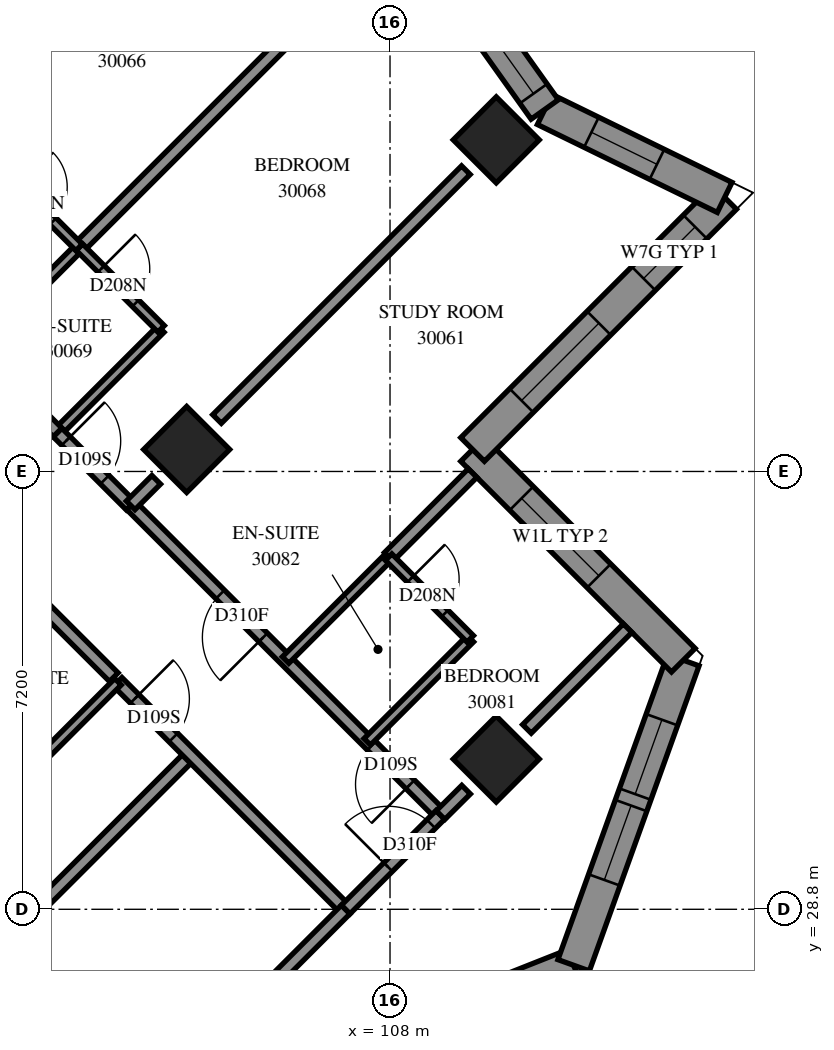
"""IFC4 building model, lengths in metres.
Left out: names, types, materials, properties, quantities, classifications, styles, units other than length and angle.
Written with IfcOpenShell. Run it as: python <this file> out.ifc"""

import sys

from ifc_helpers import new_model, si_unit, direction, frame, frame_2d, origin, origin_2d, place, context, subcontext, project, spatial, polyline, rectangle, outline, extrude, element, fill, save


model = new_model("IFC4")
c1 = context("Model", 3, precision=1e-05, world=origin(), true_north=direction((0.0, 1.0)))
c2 = subcontext(c1, "Body", "Model", "MODEL_VIEW")
j1 = project(units=[si_unit("LENGTHUNIT", "METRE"), si_unit("PLANEANGLEUNIT", "RADIAN")], contexts=[c1])
p1 = place(None, origin())
s1 = spatial("IfcSite", under=j1, at=p1, CompositionType="ELEMENT")
p2 = place(p1, origin())
s2 = spatial("IfcBuilding", under=s1, at=p2, CompositionType="ELEMENT")
p3 = place(p2, frame((0.0, 0.0, 111.8)))
s3 = spatial("IfcBuildingStorey", under=s2, at=p3, CompositionType="ELEMENT", Elevation=111.8)
for number, where, z_axis, x_axis in (
    (1, (109.747, 41.453, 0.0), (0.0, 0.0, 1.0), (0.707, -0.707, 0.0)),
    (2, (104.656, 36.362, 0.0), (0.0, 0.0, 1.0), (0.707, -0.707, 0.0)),
    (3, (109.747, 31.271, 0.0), (0.0, 0.0, 1.0), (0.707, -0.707, 0.0)),
):
    element("IfcColumn", number, at=place(p3, frame(where, z_axis=z_axis, x_axis=x_axis)), inside=s3, PredefinedType="COLUMN", context=c2, shape_type="SweptSolid", body=[
        extrude(rectangle(XDim=1.0, YDim=1.0, at=origin_2d()), origin(), (0.0, 0.0, 1.0), 3.1),
    ])
p4 = place(p3, frame((105.868, 25.835, 0.0), z_axis=(0.0, 0.0, 1.0), x_axis=(0.9295367521, 0.368729476, 0.0)))
e4 = element("IfcWall", 4, at=p4, inside=s3, PredefinedType="SOLIDWALL", context=c2, shape_type="SweptSolid", body=[
    extrude(outline(polyline([(0.119, -0.275), (5.667, -0.275), (5.418, 0.275), (-0.119, 0.275), (0.119, -0.275)])), origin(), (0.0, 0.0, 1.0), 3.1),
])
p5 = place(p4, frame((0.647, 0.0, 0.5)))
e5 = element("IfcOpeningElement", 5, at=p5, cuts=e4, PredefinedType="OPENING", context=c2, shape_type="SweptSolid", body=[
    extrude(rectangle(XDim=1.2, YDim=2.45, at=frame_2d((0.6, 1.225))), frame((0.0, 0.285, 0.0), z_axis=(0.0, -1.0, 0.0), x_axis=(1.0, 0.0, 0.0)), (0.0, 0.0, 1.0), 0.57),
])
p6 = place(p4, frame((3.156, 0.0, 0.5)))
e6 = element("IfcOpeningElement", 6, at=p6, cuts=e4, PredefinedType="OPENING", context=c2, shape_type="SweptSolid", body=[
    extrude(rectangle(XDim=1.2, YDim=2.45, at=frame_2d((0.6, 1.225))), frame((0.0, 0.285, 0.0), z_axis=(0.0, -1.0, 0.0), x_axis=(1.0, 0.0, 0.0)), (0.0, 0.0, 1.0), 0.57),
])
p7 = place(p3, frame((111.02, 27.879, 0.0), z_axis=(0.0, 0.0, 1.0), x_axis=(0.3382106652, 0.9410704256, 0.0)))
e7 = element("IfcWall", 7, at=p7, inside=s3, PredefinedType="SOLIDWALL", context=c2, shape_type="SweptSolid", body=[
    extrude(outline(polyline([(-0.124, -0.275), (5.506, -0.275), (5.157, 0.275), (0.124, 0.275), (-0.124, -0.275)])), origin(), (0.0, 0.0, 1.0), 3.1),
])
p8 = place(p7, frame((1.491, 0.0, 0.5)))
e8 = element("IfcOpeningElement", 8, at=p8, cuts=e7, PredefinedType="OPENING", context=c2, shape_type="SweptSolid", body=[
    extrude(rectangle(XDim=1.3, YDim=2.45, at=frame_2d((0.65, 1.225))), frame((0.0, 0.285, 0.0), z_axis=(0.0, -1.0, 0.0), x_axis=(1.0, 0.0, 0.0)), (0.0, 0.0, 1.0), 0.57),
])
p9 = place(p7, frame((2.991, 0.0, 0.5)))
e9 = element("IfcOpeningElement", 9, at=p9, cuts=e7, PredefinedType="OPENING", context=c2, shape_type="SweptSolid", body=[
    extrude(rectangle(XDim=1.3, YDim=2.45, at=frame_2d((0.65, 1.225))), frame((0.0, 0.285, 0.0), z_axis=(0.0, -1.0, 0.0), x_axis=(1.0, 0.0, 0.0)), (0.0, 0.0, 1.0), 0.57),
])
p10 = place(p3, frame((112.823, 32.897, 0.0), z_axis=(0.0, 0.0, 1.0), x_axis=(-0.7071067812, 0.7071067812, 0.0)))
e10 = element("IfcWall", 10, at=p10, inside=s3, PredefinedType="SOLIDWALL", context=c2, shape_type="SweptSolid", body=[
    extrude(outline(polyline([(-0.174, -0.275), (4.626, -0.275), (5.176, 0.275), (0.174, 0.275), (-0.174, -0.275)])), origin(), (0.0, 0.0, 1.0), 3.1),
])
p11 = place(p10, frame((1.963, 0.0, 0.6)))
e11 = element("IfcOpeningElement", 11, at=p11, cuts=e10, PredefinedType="OPENING", context=c2, shape_type="SweptSolid", body=[
    extrude(rectangle(XDim=1.8, YDim=1.9, at=frame_2d((0.9, 0.95))), frame((0.0, 0.285, 0.0), z_axis=(0.0, -1.0, 0.0), x_axis=(1.0, 0.0, 0.0)), (0.0, 0.0, 1.0), 0.57),
])
p12 = place(p3, frame((109.358, 36.362, 0.0), z_axis=(0.0, 0.0, 1.0), x_axis=(0.7071067812, 0.7071067812, 0.0)))
e12 = element("IfcWall", 12, at=p12, inside=s3, PredefinedType="SOLIDWALL", context=c2, shape_type="SweptSolid", body=[
    extrude(outline(polyline([(0.275, -0.275), (6.247, -0.275), (5.477, 0.275), (-0.275, 0.275), (0.275, -0.275)])), origin(), (0.0, 0.0, 1.0), 3.1),
])
p13 = place(p12, frame((1.137, 0.0, 0.6)))
e13 = element("IfcOpeningElement", 13, at=p13, cuts=e12, PredefinedType="OPENING", context=c2, shape_type="SweptSolid", body=[
    extrude(rectangle(XDim=1.8, YDim=1.9, at=frame_2d((0.9, 0.95))), frame((0.0, 0.285, 0.0), z_axis=(0.0, -1.0, 0.0), x_axis=(1.0, 0.0, 0.0)), (0.0, 0.0, 1.0), 0.57),
])
p14 = place(p12, frame((3.976, 0.0, 0.6)))
e14 = element("IfcOpeningElement", 14, at=p14, cuts=e12, PredefinedType="OPENING", context=c2, shape_type="SweptSolid", body=[
    extrude(rectangle(XDim=1.2, YDim=1.9, at=frame_2d((0.6, 0.95))), frame((0.0, 0.285, 0.0), z_axis=(0.0, -1.0, 0.0), x_axis=(1.0, 0.0, 0.0)), (0.0, 0.0, 1.0), 0.57),
])
p15 = place(p3, frame((113.503, 40.507, 0.0), z_axis=(0.0, 0.0, 1.0), x_axis=(-0.8984293541, 0.4391180887, 0.0)))
e15 = element("IfcWall", 15, at=p15, inside=s3, PredefinedType="SOLIDWALL", context=c2, shape_type="SweptSolid", body=[
    extrude(outline(polyline([(-0.385, -0.275), (3.224, -0.275), (3.363, 0.275), (0.385, 0.275), (-0.385, -0.275)])), origin(), (0.0, 0.0, 1.0), 3.1),
])
p16 = place(p15, frame((1.239, 0.0, 0.5)))
e16 = element("IfcOpeningElement", 16, at=p16, cuts=e15, PredefinedType="OPENING", context=c2, shape_type="SweptSolid", body=[
    extrude(rectangle(XDim=1.2, YDim=2.45, at=frame_2d((0.6, 1.225))), frame((0.0, 0.285, 0.0), z_axis=(0.0, -1.0, 0.0), x_axis=(1.0, 0.0, 0.0)), (0.0, 0.0, 1.0), 0.57),
])
p17 = place(p3, frame((110.544, 41.953, 0.0), z_axis=(0.0, 0.0, 1.0), x_axis=(-0.5805022438, 0.8142586474, 0.0)))
e17 = element("IfcWall", 17, at=p17, inside=s3, PredefinedType="SOLIDWALL", context=c2, shape_type="SweptSolid", body=[
    extrude(outline(polyline([(0.07, -0.275), (3.53, -0.275), (3.438, 0.275), (-0.07, 0.275), (0.07, -0.275)])), origin(), (0.0, 0.0, 1.0), 3.1),
])
p18 = place(p17, frame((0.319, 0.0, 0.5)))
e18 = element("IfcOpeningElement", 18, at=p18, cuts=e17, PredefinedType="OPENING", context=c2, shape_type="SweptSolid", body=[
    extrude(rectangle(XDim=1.3, YDim=2.45, at=frame_2d((0.65, 1.225))), frame((0.0, 0.285, 0.0), z_axis=(0.0, -1.0, 0.0), x_axis=(1.0, 0.0, 0.0)), (0.0, 0.0, 1.0), 0.57),
])
p19 = place(p17, frame((1.819, 0.0, 0.5)))
e19 = element("IfcOpeningElement", 19, at=p19, cuts=e17, PredefinedType="OPENING", context=c2, shape_type="SweptSolid", body=[
    extrude(rectangle(XDim=1.3, YDim=2.45, at=frame_2d((0.65, 1.225))), frame((0.0, 0.285, 0.0), z_axis=(0.0, -1.0, 0.0), x_axis=(1.0, 0.0, 0.0)), (0.0, 0.0, 1.0), 0.57),
])
p20 = place(p3, frame((96.474, 23.09, 0.0), z_axis=(0.0, 0.0, 1.0), x_axis=(0.7071067812, 0.7071067812, 0.0)))
e20 = element("IfcWall", 20, at=p20, inside=s3, PredefinedType="PARTITIONING", context=c2, shape_type="SweptSolid", body=[
    extrude(rectangle(XDim=11.67, YDim=0.2, at=frame_2d((5.835, 0.0))), origin(), (0.0, 0.0, 1.0), 3.1),
])
p21 = place(p3, frame((102.888, 39.687, 0.0), z_axis=(0.0, 0.0, 1.0), x_axis=(0.7072515706, 0.7069619621, 0.0)))
e21 = element("IfcWall", 21, at=p21, inside=s3, PredefinedType="PARTITIONING", context=c2, shape_type="SweptSolid", body=[
    extrude(rectangle(XDim=7.251, YDim=0.2, at=frame_2d((3.626, 0.0))), origin(), (0.0, 0.0, 1.0), 3.1),
])
p22 = place(p3, frame((108.831, 30.355, 0.0), z_axis=(0.0, 0.0, 1.0), x_axis=(-0.7073012053, 0.7069123036, 0.0)))
e22 = element("IfcWall", 22, at=p22, inside=s3, PredefinedType="PARTITIONING", context=c2, shape_type="SweptSolid", body=[
    extrude(rectangle(XDim=7.2, YDim=0.2, at=frame_2d((3.6, 0.0))), origin(), (0.0, 0.0, 1.0), 3.1),
])
p23 = place(p22, frame((4.125, 0.0, 0.0)))
e23 = element("IfcOpeningElement", 23, at=p23, cuts=e22, PredefinedType="OPENING", context=c2, shape_type="SweptSolid", body=[
    extrude(rectangle(XDim=1.0, YDim=2.1, at=frame_2d((0.5, 1.05))), frame((0.0, 0.11, 0.0), z_axis=(0.0, -1.0, 0.0), x_axis=(1.0, 0.0, 0.0)), (0.0, 0.0, 1.0), 0.22),
])
p24 = place(p22, frame((0.705, 0.0, 0.0)))
e24 = element("IfcOpeningElement", 24, at=p24, cuts=e22, PredefinedType="OPENING", context=c2, shape_type="SweptSolid", body=[
    extrude(rectangle(XDim=0.9, YDim=2.1, at=frame_2d((0.45, 1.05))), frame((0.0, 0.11, 0.0), z_axis=(0.0, -1.0, 0.0), x_axis=(1.0, 0.0, 0.0)), (0.0, 0.0, 1.0), 0.22),
])
for number, where, z_axis, x_axis in (
    (25, (105.155, 36.863, 0.0), (0.0, 0.0, 1.0), (0.707, 0.707, 0.0)),
    (26, (100.063, 41.953, 0.0), (0.0, 0.0, 1.0), (0.707, 0.707, 0.0)),
):
    element("IfcWall", number, at=place(p3, frame(where, z_axis=z_axis, x_axis=x_axis)), inside=s3, PredefinedType="PARTITIONING", context=c2, shape_type="SweptSolid", body=[
        extrude(rectangle(XDim=5.787, YDim=0.2, at=frame_2d((2.893, 0.0))), origin(), (0.0, 0.0, 1.0), 3.1),
    ])
p25 = place(p3, frame((103.521, 32.541, 0.0), z_axis=(0.0, 0.0, 1.0), x_axis=(0.7071067812, -0.7071067812, 0.0)))
e27 = element("IfcWall", 27, at=p25, inside=s3, PredefinedType="PARTITIONING", context=c2, shape_type="SweptSolid", body=[
    extrude(rectangle(XDim=5.301, YDim=0.2, at=frame_2d((2.65, 0.0))), origin(), (0.0, 0.0, 1.0), 3.1),
])
p26 = place(p25, frame((0.396, 0.0, 0.0)))
e28 = element("IfcOpeningElement", 28, at=p26, cuts=e27, PredefinedType="OPENING", context=c2, shape_type="SweptSolid", body=[
    extrude(rectangle(XDim=0.9, YDim=2.1, at=frame_2d((0.45, 1.05))), frame((0.0, 0.11, 0.0), z_axis=(0.0, -1.0, 0.0), x_axis=(1.0, 0.0, 0.0)), (0.0, 0.0, 1.0), 0.22),
])
p27 = place(p3, frame((105.155, 26.681, 0.0), z_axis=(0.0, 0.0, 1.0), x_axis=(0.7071067812, 0.7071067812, 0.0)))
e29 = element("IfcWall", 29, at=p27, inside=s3, PredefinedType="PARTITIONING", context=c2, shape_type="SweptSolid", body=[
    extrude(rectangle(XDim=2.993, YDim=0.2, at=frame_2d((1.496, 0.0))), origin(), (0.0, 0.0, 1.0), 2.6),
])
p28 = place(p3, frame((102.533, 36.645, 0.0), z_axis=(0.0, 0.0, 1.0), x_axis=(0.7071067812, 0.7071067812, 0.0)))
e30 = element("IfcWall", 30, at=p28, inside=s3, PredefinedType="PARTITIONING", context=c2, shape_type="SweptSolid", body=[
    extrude(rectangle(XDim=2.401, YDim=0.15, at=frame_2d((1.201, 0.0))), origin(), (0.0, 0.0, 1.0), 3.1),
])
for number, where, z_axis, x_axis in (
    (31, (101.192, 37.988, 0.0), (0.0, 0.0, 1.0), (0.707, 0.708, 0.0)),
    (32, (101.83, 30.844, 0.0), (0.0, 0.0, 1.0), (0.707, 0.708, 0.0)),
):
    element("IfcWall", number, at=place(p3, frame(where, z_axis=z_axis, x_axis=x_axis)), inside=s3, PredefinedType="PARTITIONING", context=c2, shape_type="SweptSolid", body=[
        extrude(rectangle(XDim=2.4, YDim=0.15, at=frame_2d((1.2, 0.0))), origin(), (0.0, 0.0, 1.0), 3.1),
    ])
for number, where, z_axis, x_axis in (
    (33, (106.283, 32.899, 0.0), (0.0, 0.0, 1.0), (0.707, 0.707, 0.0)),
    (34, (107.625, 31.555, 0.0), (0.0, 0.0, 1.0), (0.707, 0.707, 0.0)),
):
    element("IfcWall", number, at=place(p3, frame(where, z_axis=z_axis, x_axis=x_axis)), inside=s3, PredefinedType="PARTITIONING", context=c2, shape_type="SweptSolid", body=[
        extrude(rectangle(XDim=2.398, YDim=0.15, at=frame_2d((1.199, 0.0))), origin(), (0.0, 0.0, 1.0), 3.1),
    ])
p29 = place(p3, frame((110.251, 31.767, 0.0), z_axis=(0.0, 0.0, 1.0), x_axis=(0.7066584143, 0.7075548639, 0.0)))
e35 = element("IfcWall", 35, at=p29, inside=s3, PredefinedType="PARTITIONING", context=c2, shape_type="SweptSolid", body=[
    extrude(rectangle(XDim=2.343, YDim=0.2, at=frame_2d((1.171, 0.0))), origin(), (0.0, 0.0, 1.0), 3.1),
])
p30 = place(p3, frame((107.271, 28.797, 0.0), z_axis=(0.0, 0.0, 1.0), x_axis=(0.7071067812, 0.7071067812, 0.0)))
e36 = element("IfcWall", 36, at=p30, inside=s3, PredefinedType="PARTITIONING", context=c2, shape_type="SweptSolid", body=[
    extrude(rectangle(XDim=2.2, YDim=0.2, at=frame_2d((1.1, 0.0))), origin(), (0.0, 0.0, 1.0), 2.6),
])
p31 = place(p30, frame((0.987, 0.0, 0.0)))
e37 = element("IfcOpeningElement", 37, at=p31, cuts=e36, PredefinedType="OPENING", context=c2, shape_type="SweptSolid", body=[
    extrude(rectangle(XDim=1.0, YDim=2.1, at=frame_2d((0.5, 1.05))), frame((0.0, 0.11, 0.0), z_axis=(0.0, -1.0, 0.0), x_axis=(1.0, 0.0, 0.0)), (0.0, 0.0, 1.0), 0.22),
])
p32 = place(p3, frame((102.891, 39.69, 0.0), z_axis=(0.0, 0.0, 1.0), x_axis=(0.7071067812, -0.7071067812, 0.0)))
e38 = element("IfcWall", 38, at=p32, inside=s3, PredefinedType="PARTITIONING", context=c2, shape_type="SweptSolid", body=[
    extrude(rectangle(XDim=1.901, YDim=0.15, at=frame_2d((0.95, 0.0))), origin(), (0.0, 0.0, 1.0), 3.1),
])
p33 = place(p32, frame((0.505, 0.0, 0.0)))
e39 = element("IfcOpeningElement", 39, at=p33, cuts=e38, PredefinedType="OPENING", context=c2, shape_type="SweptSolid", body=[
    extrude(rectangle(XDim=0.8, YDim=2.1, at=frame_2d((0.4, 1.05))), frame((0.0, 0.085, 0.0), z_axis=(0.0, -1.0, 0.0), x_axis=(1.0, 0.0, 0.0)), (0.0, 0.0, 1.0), 0.17),
])
p34 = place(p3, frame((107.979, 34.595, 0.0), z_axis=(0.0, 0.0, 1.0), x_axis=(0.7071067812, 0.7071067812, 0.0)))
e40 = element("IfcWall", 40, at=p34, inside=s3, PredefinedType="PARTITIONING", context=c2, shape_type="SweptSolid", body=[
    extrude(rectangle(XDim=1.95, YDim=0.2, at=frame_2d((0.975, 0.0))), origin(), (0.0, 0.0, 1.0), 3.1),
])
p35 = place(p3, frame((107.977, 34.591, 0.0), z_axis=(0.0, 0.0, 1.0), x_axis=(0.7065800724, -0.7076330979, 0.0)))
e41 = element("IfcWall", 41, at=p35, inside=s3, PredefinedType="PARTITIONING", context=c2, shape_type="SweptSolid", body=[
    extrude(rectangle(XDim=1.899, YDim=0.15, at=frame_2d((0.95, 0.0))), origin(), (0.0, 0.0, 1.0), 3.1),
])
p36 = place(p35, frame((0.508, 0.0, 0.0)))
e42 = element("IfcOpeningElement", 42, at=p36, cuts=e41, PredefinedType="OPENING", context=c2, shape_type="SweptSolid", body=[
    extrude(rectangle(XDim=0.8, YDim=2.1, at=frame_2d((0.4, 1.05))), frame((0.0, 0.085, 0.0), z_axis=(0.0, -1.0, 0.0), x_axis=(1.0, 0.0, 0.0)), (0.0, 0.0, 1.0), 0.17),
])
p37 = place(p3, frame((101.543, 41.027, 0.0), z_axis=(0.0, 0.0, 1.0), x_axis=(0.7076330979, -0.7065800724, 0.0)))
e43 = element("IfcWall", 43, at=p37, inside=s3, PredefinedType="PARTITIONING", context=c2, shape_type="SweptSolid", body=[
    extrude(rectangle(XDim=1.899, YDim=0.15, at=frame_2d((0.95, 0.0))), origin(), (0.0, 0.0, 1.0), 3.1),
])
p38 = place(p37, frame((0.493, 0.0, 0.0)))
e44 = element("IfcOpeningElement", 44, at=p38, cuts=e43, PredefinedType="OPENING", context=c2, shape_type="SweptSolid", body=[
    extrude(rectangle(XDim=0.8, YDim=2.1, at=frame_2d((0.4, 1.05))), frame((0.0, 0.085, 0.0), z_axis=(0.0, -1.0, 0.0), x_axis=(1.0, 0.0, 0.0)), (0.0, 0.0, 1.0), 0.17),
])
p39 = place(p3, frame((102.183, 33.889, 0.0), z_axis=(0.0, 0.0, 1.0), x_axis=(0.7076620277, -0.7065510983, 0.0)))
e45 = element("IfcWall", 45, at=p39, inside=s3, PredefinedType="PARTITIONING", context=c2, shape_type="SweptSolid", body=[
    extrude(rectangle(XDim=1.8, YDim=0.2, at=frame_2d((0.9, 0.0))), origin(), (0.0, 0.0, 1.0), 3.1),
])
p40 = place(p3, frame((102.531, 36.641, 0.0), z_axis=(0.0, 0.0, 1.0), x_axis=(0.7071067812, -0.7071067812, 0.0)))
e46 = element("IfcWall", 46, at=p40, inside=s3, PredefinedType="PARTITIONING", context=c2, shape_type="SweptSolid", body=[
    extrude(rectangle(XDim=1.7, YDim=0.2, at=frame_2d((0.85, 0.0))), origin(), (0.0, 0.0, 1.0), 3.1),
])
p41 = place(p40, frame((0.198, 0.0, 0.0)))
e47 = element("IfcOpeningElement", 47, at=p41, cuts=e46, PredefinedType="OPENING", context=c2, shape_type="SweptSolid", body=[
    extrude(rectangle(XDim=0.9, YDim=2.1, at=frame_2d((0.45, 1.05))), frame((0.0, 0.11, 0.0), z_axis=(0.0, -1.0, 0.0), x_axis=(1.0, 0.0, 0.0)), (0.0, 0.0, 1.0), 0.22),
])
p42 = place(p3, frame((102.103, 37.075, 0.0), z_axis=(0.0, 0.0, 1.0), x_axis=(0.7054642634, -0.7087454925, 0.0)))
e48 = element("IfcWall", 48, at=p42, inside=s3, PredefinedType="PARTITIONING", context=c2, shape_type="SweptSolid", body=[
    extrude(rectangle(XDim=0.61, YDim=0.2, at=frame_2d((0.305, 0.0))), origin(), (0.0, 0.0, 1.0), 3.1),
])
p43 = place(p3, frame((103.735, 35.443, 0.0), z_axis=(0.0, 0.0, 1.0), x_axis=(0.7071067812, 0.7071067812, 0.0)))
e49 = element("IfcWall", 49, at=p43, inside=s3, PredefinedType="PARTITIONING", context=c2, shape_type="SweptSolid", body=[
    extrude(rectangle(XDim=0.594, YDim=0.2, at=frame_2d((0.297, 0.0))), origin(), (0.0, 0.0, 1.0), 3.1),
])
p44 = place(p3, frame((108.831, 30.349, 0.0), z_axis=(0.0, 0.0, 1.0), x_axis=(0.7087923682, 0.7054171665, 0.0)))
e50 = element("IfcWall", 50, at=p44, inside=s3, PredefinedType="PARTITIONING", context=c2, shape_type="SweptSolid", body=[
    extrude(rectangle(XDim=0.593, YDim=0.2, at=frame_2d((0.296, 0.0))), origin(), (0.0, 0.0, 1.0), 2.6),
])
p45 = place(p8, origin())
e51 = element("IfcWindow", 51, at=p45, inside=s3, PartitioningType="SINGLE_PANEL", PredefinedType="WINDOW", context=c2, shape_type="SweptSolid", body=[
    extrude(rectangle(XDim=1.3, YDim=2.45, at=frame_2d((0.65, 1.225))), frame((0.0, 0.155, 0.0), z_axis=(0.0, -1.0, 0.0), x_axis=(1.0, 0.0, 0.0)), (0.0, 0.0, 1.0), 0.06),
])
fill(e8, e51)
p46 = place(p9, origin())
e52 = element("IfcWindow", 52, at=p46, inside=s3, PartitioningType="SINGLE_PANEL", PredefinedType="WINDOW", context=c2, shape_type="SweptSolid", body=[
    extrude(rectangle(XDim=1.3, YDim=2.45, at=frame_2d((0.65, 1.225))), frame((0.0, 0.155, 0.0), z_axis=(0.0, -1.0, 0.0), x_axis=(1.0, 0.0, 0.0)), (0.0, 0.0, 1.0), 0.06),
])
fill(e9, e52)
p47 = place(p11, origin())
e53 = element("IfcWindow", 53, at=p47, inside=s3, PartitioningType="SINGLE_PANEL", PredefinedType="WINDOW", context=c2, shape_type="SweptSolid", body=[
    extrude(rectangle(XDim=1.8, YDim=1.9, at=frame_2d((0.9, 0.95))), frame((0.0, 0.155, 0.0), z_axis=(0.0, -1.0, 0.0), x_axis=(1.0, 0.0, 0.0)), (0.0, 0.0, 1.0), 0.06),
])
fill(e11, e53)
p48 = place(p13, origin())
e54 = element("IfcWindow", 54, at=p48, inside=s3, PartitioningType="SINGLE_PANEL", PredefinedType="WINDOW", context=c2, shape_type="SweptSolid", body=[
    extrude(rectangle(XDim=1.8, YDim=1.9, at=frame_2d((0.9, 0.95))), frame((0.0, 0.155, 0.0), z_axis=(0.0, -1.0, 0.0), x_axis=(1.0, 0.0, 0.0)), (0.0, 0.0, 1.0), 0.06),
])
fill(e13, e54)
p49 = place(p14, origin())
e55 = element("IfcWindow", 55, at=p49, inside=s3, PartitioningType="SINGLE_PANEL", PredefinedType="WINDOW", context=c2, shape_type="SweptSolid", body=[
    extrude(rectangle(XDim=1.2, YDim=1.9, at=frame_2d((0.6, 0.95))), frame((0.0, 0.155, 0.0), z_axis=(0.0, -1.0, 0.0), x_axis=(1.0, 0.0, 0.0)), (0.0, 0.0, 1.0), 0.06),
])
fill(e14, e55)
p50 = place(p16, origin())
e56 = element("IfcWindow", 56, at=p50, inside=s3, PartitioningType="SINGLE_PANEL", PredefinedType="WINDOW", context=c2, shape_type="SweptSolid", body=[
    extrude(rectangle(XDim=1.2, YDim=2.45, at=frame_2d((0.6, 1.225))), frame((0.0, 0.155, 0.0), z_axis=(0.0, -1.0, 0.0), x_axis=(1.0, 0.0, 0.0)), (0.0, 0.0, 1.0), 0.06),
])
fill(e16, e56)
p51 = place(p18, origin())
e57 = element("IfcWindow", 57, at=p51, inside=s3, PartitioningType="SINGLE_PANEL", PredefinedType="WINDOW", context=c2, shape_type="SweptSolid", body=[
    extrude(rectangle(XDim=1.3, YDim=2.45, at=frame_2d((0.65, 1.225))), frame((0.0, 0.155, 0.0), z_axis=(0.0, -1.0, 0.0), x_axis=(1.0, 0.0, 0.0)), (0.0, 0.0, 1.0), 0.06),
])
fill(e18, e57)
p52 = place(p23, origin())
e58 = element("IfcDoor", 58, at=p52, inside=s3, OperationType="SINGLE_SWING_LEFT", PredefinedType="DOOR", context=c2, shape_type="SweptSolid", body=[
    extrude(rectangle(XDim=1.0, YDim=2.1, at=frame_2d((0.5, 1.05))), frame((0.0, 0.025, 0.0), z_axis=(0.0, -1.0, 0.0), x_axis=(1.0, 0.0, 0.0)), (0.0, 0.0, 1.0), 0.05),
])
fill(e23, e58)
p53 = place(p38, origin())
e59 = element("IfcDoor", 59, at=p53, inside=s3, OperationType="SINGLE_SWING_RIGHT", PredefinedType="DOOR", context=c2, shape_type="SweptSolid", body=[
    extrude(rectangle(XDim=0.8, YDim=2.1, at=frame_2d((0.4, 1.05))), frame((0.0, 0.025, 0.0), z_axis=(0.0, -1.0, 0.0), x_axis=(1.0, 0.0, 0.0)), (0.0, 0.0, 1.0), 0.05),
])
fill(e44, e59)
p54 = place(p41, origin())
e60 = element("IfcDoor", 60, at=p54, inside=s3, OperationType="SINGLE_SWING_RIGHT", PredefinedType="DOOR", context=c2, shape_type="SweptSolid", body=[
    extrude(rectangle(XDim=0.9, YDim=2.1, at=frame_2d((0.45, 1.05))), frame((0.0, 0.025, 0.0), z_axis=(0.0, -1.0, 0.0), x_axis=(1.0, 0.0, 0.0)), (0.0, 0.0, 1.0), 0.05),
])
fill(e47, e60)
p55 = place(p33, origin())
e61 = element("IfcDoor", 61, at=p55, inside=s3, OperationType="SINGLE_SWING_RIGHT", PredefinedType="DOOR", context=c2, shape_type="SweptSolid", body=[
    extrude(rectangle(XDim=0.8, YDim=2.1, at=frame_2d((0.4, 1.05))), frame((0.0, 0.025, 0.0), z_axis=(0.0, -1.0, 0.0), x_axis=(1.0, 0.0, 0.0)), (0.0, 0.0, 1.0), 0.05),
])
fill(e39, e61)
p56 = place(p26, origin())
e62 = element("IfcDoor", 62, at=p56, inside=s3, OperationType="SINGLE_SWING_RIGHT", PredefinedType="DOOR", context=c2, shape_type="SweptSolid", body=[
    extrude(rectangle(XDim=0.9, YDim=2.1, at=frame_2d((0.45, 1.05))), frame((0.0, 0.025, 0.0), z_axis=(0.0, -1.0, 0.0), x_axis=(1.0, 0.0, 0.0)), (0.0, 0.0, 1.0), 0.05),
])
fill(e28, e62)
p57 = place(p24, origin())
e63 = element("IfcDoor", 63, at=p57, inside=s3, OperationType="SINGLE_SWING_RIGHT", PredefinedType="DOOR", context=c2, shape_type="SweptSolid", body=[
    extrude(rectangle(XDim=0.9, YDim=2.1, at=frame_2d((0.45, 1.05))), frame((0.0, 0.025, 0.0), z_axis=(0.0, -1.0, 0.0), x_axis=(1.0, 0.0, 0.0)), (0.0, 0.0, 1.0), 0.05),
])
fill(e24, e63)
p58 = place(p36, origin())
e64 = element("IfcDoor", 64, at=p58, inside=s3, OperationType="SINGLE_SWING_RIGHT", PredefinedType="DOOR", context=c2, shape_type="SweptSolid", body=[
    extrude(rectangle(XDim=0.8, YDim=2.1, at=frame_2d((0.4, 1.05))), frame((0.0, 0.025, 0.0), z_axis=(0.0, -1.0, 0.0), x_axis=(1.0, 0.0, 0.0)), (0.0, 0.0, 1.0), 0.05),
])
fill(e42, e64)
p59 = place(p31, origin())
e65 = element("IfcDoor", 65, at=p59, inside=s3, OperationType="SINGLE_SWING_RIGHT", PredefinedType="DOOR", context=c2, shape_type="SweptSolid", body=[
    extrude(rectangle(XDim=1.0, YDim=2.1, at=frame_2d((0.5, 1.05))), frame((0.0, 0.025, 0.0), z_axis=(0.0, -1.0, 0.0), x_axis=(1.0, 0.0, 0.0)), (0.0, 0.0, 1.0), 0.05),
])
fill(e37, e65)
save(model, sys.argv[1])
